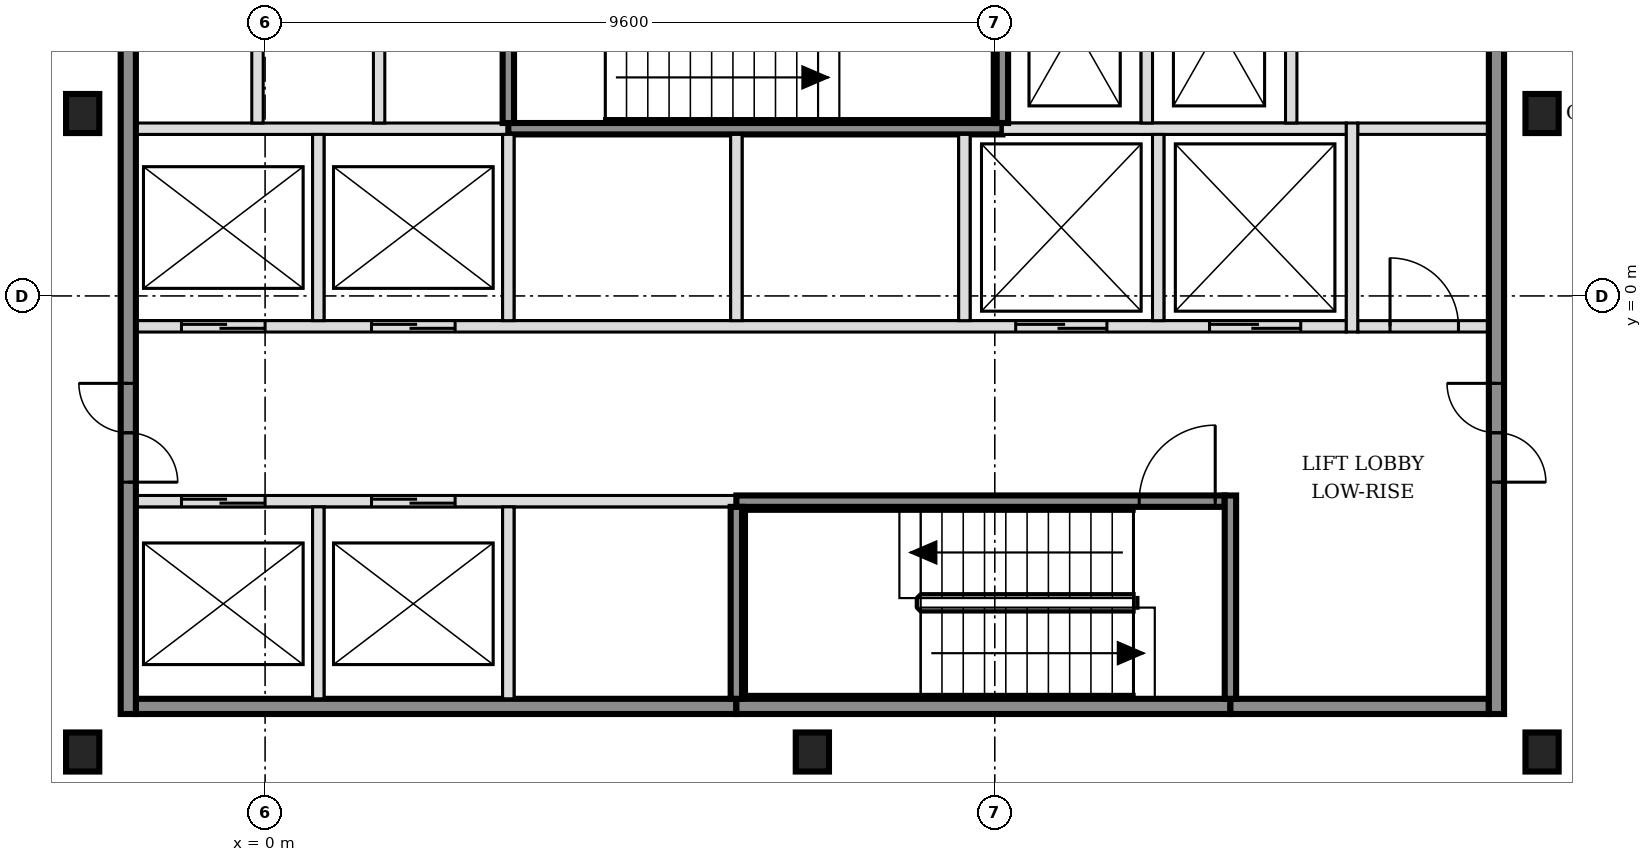
"""IFC4 building model, lengths in metres.
Left out: names, types, materials, properties, quantities, classifications, styles, units other than length and angle.
Written with IfcOpenShell. Run it as: python <this file> out.ifc"""

import sys

from ifc_helpers import new_model, si_unit, direction, frame, frame_2d, origin, origin_2d, place, context, subcontext, project, spatial, rectangle, i_section, extrude, element, fill, save


model = new_model("IFC4")
c1 = context("Model", 3, precision=1e-05, world=origin(), true_north=direction((0.0, 1.0)))
c2 = subcontext(c1, "Body", "Model", "MODEL_VIEW")
j1 = project(units=[si_unit("LENGTHUNIT", "METRE"), si_unit("PLANEANGLEUNIT", "RADIAN")], contexts=[c1])
p1 = place(None, origin())
s1 = spatial("IfcSite", under=j1, at=p1, CompositionType="ELEMENT")
p2 = place(p1, origin())
s2 = spatial("IfcBuilding", under=s1, at=p2, CompositionType="ELEMENT")
p3 = place(p2, frame((0.0, 0.0, 90.6)))
s3 = spatial("IfcBuildingStorey", under=s2, at=p3, CompositionType="ELEMENT", Elevation=90.6)
for number, where, z_axis, x_axis in (
    (1, (-2.4, -6.0, -0.15), (0.0, 0.0, 1.0), (1.0, 0.0, 0.0)),
    (2, (7.2, -6.0, -0.15), (0.0, 0.0, 1.0), (1.0, 0.0, 0.0)),
    (3, (16.8, -6.0, -0.15), (0.0, 0.0, 1.0), (1.0, 0.0, 0.0)),
    (4, (-2.4, 2.4, -0.15), (0.0, 0.0, 1.0), (1.0, 0.0, 0.0)),
    (5, (16.8, 2.4, -0.15), (0.0, 0.0, 1.0), (1.0, 0.0, 0.0)),
):
    element("IfcColumn", number, at=place(p3, frame(where, z_axis=z_axis, x_axis=x_axis)), inside=s3, PredefinedType="COLUMN", context=c2, shape_type="SweptSolid", body=[
        extrude(i_section(OverallWidth=0.437, OverallDepth=0.514, WebThickness=0.061, FlangeThickness=0.097, FilletRadius=0.015, at=origin_2d()), origin(), (0.0, 0.0, 1.0), 3.6),
    ])
p4 = place(p3, frame((-1.7, -5.4, 0.0), z_axis=(0.0, 0.0, 1.0), x_axis=(1.0, 0.0, 0.0)))
e6 = element("IfcWall", 6, at=p4, inside=s3, PredefinedType="SOLIDWALL", context=c2, shape_type="SweptSolid", body=[
    extrude(rectangle(XDim=7.9, YDim=0.2, at=frame_2d((3.95, 0.0))), origin(), (0.0, 0.0, 1.0), 3.45),
])
p5 = place(p3, frame((6.2, -5.4, 0.0), z_axis=(0.0, 0.0, 1.0), x_axis=(1.0, 0.0, 0.0)))
e7 = element("IfcWall", 7, at=p5, inside=s3, PredefinedType="SOLIDWALL", context=c2, shape_type="SweptSolid", body=[
    extrude(rectangle(XDim=6.5, YDim=0.2, at=frame_2d((3.25, 0.0))), origin(), (0.0, 0.0, 1.0), 3.45),
])
p6 = place(p3, frame((12.7, -5.4, 0.0), z_axis=(0.0, 0.0, 1.0), x_axis=(1.0, 0.0, 0.0)))
e8 = element("IfcWall", 8, at=p6, inside=s3, PredefinedType="SOLIDWALL", context=c2, shape_type="SweptSolid", body=[
    extrude(rectangle(XDim=3.4, YDim=0.2, at=frame_2d((1.7, 0.0))), origin(), (0.0, 0.0, 1.0), 3.45),
])
p7 = place(p3, frame((-1.7, -2.7, 0.0), z_axis=(0.0, 0.0, 1.0), x_axis=(1.0, 0.0, 0.0)))
e9 = element("IfcWall", 9, at=p7, inside=s3, PredefinedType="SOLIDWALL", context=c2, shape_type="SweptSolid", body=[
    extrude(rectangle(XDim=7.9, YDim=0.15, at=frame_2d((3.95, 0.0))), origin(), (0.0, 0.0, 1.0), 3.45),
])
p8 = place(p7, frame((0.6, 0.0, 0.0)))
e10 = element("IfcOpeningElement", 10, at=p8, cuts=e9, PredefinedType="OPENING", context=c2, shape_type="SweptSolid", body=[
    extrude(rectangle(XDim=1.1, YDim=2.1, at=frame_2d((0.55, 1.05))), frame((0.0, 0.085, 0.0), z_axis=(0.0, -1.0, 0.0), x_axis=(1.0, 0.0, 0.0)), (0.0, 0.0, 1.0), 0.17),
])
p9 = place(p7, frame((3.1, 0.0, 0.0)))
e11 = element("IfcOpeningElement", 11, at=p9, cuts=e9, PredefinedType="OPENING", context=c2, shape_type="SweptSolid", body=[
    extrude(rectangle(XDim=1.1, YDim=2.1, at=frame_2d((0.55, 1.05))), frame((0.0, 0.085, 0.0), z_axis=(0.0, -1.0, 0.0), x_axis=(1.0, 0.0, 0.0)), (0.0, 0.0, 1.0), 0.17),
])
p10 = place(p3, frame((6.2, -2.7, 0.0), z_axis=(0.0, 0.0, 1.0), x_axis=(1.0, 0.0, 0.0)))
e12 = element("IfcWall", 12, at=p10, inside=s3, PredefinedType="SOLIDWALL", context=c2, shape_type="SweptSolid", body=[
    extrude(rectangle(XDim=6.425, YDim=0.15, at=frame_2d((3.212, 0.0))), origin(), (0.0, 0.0, 1.0), 3.45),
])
p11 = place(p10, frame((5.3, 0.0, 0.0)))
e13 = element("IfcOpeningElement", 13, at=p11, cuts=e12, PredefinedType="OPENING", context=c2, shape_type="SweptSolid", body=[
    extrude(rectangle(XDim=1.0, YDim=2.1, at=frame_2d((0.5, 1.05))), frame((0.0, 0.085, 0.0), z_axis=(0.0, -1.0, 0.0), x_axis=(1.0, 0.0, 0.0)), (0.0, 0.0, 1.0), 0.17),
])
p12 = place(p3, frame((-1.7, -0.4, 0.0), z_axis=(0.0, 0.0, 1.0), x_axis=(1.0, 0.0, 0.0)))
e14 = element("IfcWall", 14, at=p12, inside=s3, PredefinedType="SOLIDWALL", context=c2, shape_type="SweptSolid", body=[
    extrude(rectangle(XDim=15.925, YDim=0.15, at=frame_2d((7.962, 0.0))), origin(), (0.0, 0.0, 1.0), 3.45),
])
p13 = place(p12, frame((0.6, 0.0, 0.0)))
e15 = element("IfcOpeningElement", 15, at=p13, cuts=e14, PredefinedType="OPENING", context=c2, shape_type="SweptSolid", body=[
    extrude(rectangle(XDim=1.1, YDim=2.1, at=frame_2d((0.55, 1.05))), frame((0.0, 0.085, 0.0), z_axis=(0.0, -1.0, 0.0), x_axis=(1.0, 0.0, 0.0)), (0.0, 0.0, 1.0), 0.17),
])
p14 = place(p12, frame((3.1, 0.0, 0.0)))
e16 = element("IfcOpeningElement", 16, at=p14, cuts=e14, PredefinedType="OPENING", context=c2, shape_type="SweptSolid", body=[
    extrude(rectangle(XDim=1.1, YDim=2.1, at=frame_2d((0.55, 1.05))), frame((0.0, 0.085, 0.0), z_axis=(0.0, -1.0, 0.0), x_axis=(1.0, 0.0, 0.0)), (0.0, 0.0, 1.0), 0.17),
])
p15 = place(p12, frame((11.575, 0.0, 0.0)))
e17 = element("IfcOpeningElement", 17, at=p15, cuts=e14, PredefinedType="OPENING", context=c2, shape_type="SweptSolid", body=[
    extrude(rectangle(XDim=1.2, YDim=2.1, at=frame_2d((0.6, 1.05))), frame((0.0, 0.085, 0.0), z_axis=(0.0, -1.0, 0.0), x_axis=(1.0, 0.0, 0.0)), (0.0, 0.0, 1.0), 0.17),
])
p16 = place(p12, frame((14.125, 0.0, 0.0)))
e18 = element("IfcOpeningElement", 18, at=p16, cuts=e14, PredefinedType="OPENING", context=c2, shape_type="SweptSolid", body=[
    extrude(rectangle(XDim=1.2, YDim=2.1, at=frame_2d((0.6, 1.05))), frame((0.0, 0.085, 0.0), z_axis=(0.0, -1.0, 0.0), x_axis=(1.0, 0.0, 0.0)), (0.0, 0.0, 1.0), 0.17),
])
p17 = place(p3, frame((14.375, -0.4, 0.0), z_axis=(0.0, 0.0, 1.0), x_axis=(1.0, 0.0, 0.0)))
e19 = element("IfcWall", 19, at=p17, inside=s3, PredefinedType="PARTITIONING", context=c2, shape_type="SweptSolid", body=[
    extrude(rectangle(XDim=1.725, YDim=0.15, at=frame_2d((0.863, 0.0))), origin(), (0.0, 0.0, 1.0), 3.45),
])
p18 = place(p17, frame((0.425, 0.0, 0.0)))
e20 = element("IfcOpeningElement", 20, at=p18, cuts=e19, PredefinedType="OPENING", context=c2, shape_type="SweptSolid", body=[
    extrude(rectangle(XDim=0.9, YDim=2.1, at=frame_2d((0.45, 1.05))), frame((0.0, 0.085, 0.0), z_axis=(0.0, -1.0, 0.0), x_axis=(1.0, 0.0, 0.0)), (0.0, 0.0, 1.0), 0.17),
])
p19 = place(p3, frame((-1.7, 2.2, 0.0), z_axis=(0.0, 0.0, 1.0), x_axis=(1.0, 0.0, 0.0)))
e21 = element("IfcWall", 21, at=p19, inside=s3, PredefinedType="SOLIDWALL", context=c2, shape_type="SweptSolid", body=[
    extrude(rectangle(XDim=4.9, YDim=0.15, at=frame_2d((2.45, 0.0))), origin(), (0.0, 0.0, 1.0), 3.45),
])
p20 = place(p3, frame((3.2, 2.2, 0.0), z_axis=(0.0, 0.0, 1.0), x_axis=(1.0, 0.0, 0.0)))
e22 = element("IfcWall", 22, at=p20, inside=s3, PredefinedType="SOLIDWALL", context=c2, shape_type="SweptSolid", body=[
    extrude(rectangle(XDim=6.5, YDim=0.15, at=frame_2d((3.25, 0.0))), origin(), (0.0, 0.0, 1.0), 3.45),
])
p21 = place(p3, frame((9.7, 2.2, 0.0), z_axis=(0.0, 0.0, 1.0), x_axis=(1.0, 0.0, 0.0)))
e23 = element("IfcWall", 23, at=p21, inside=s3, PredefinedType="SOLIDWALL", context=c2, shape_type="SweptSolid", body=[
    extrude(rectangle(XDim=4.525, YDim=0.15, at=frame_2d((2.263, 0.0))), origin(), (0.0, 0.0, 1.0), 3.45),
])
p22 = place(p3, frame((14.375, 2.2, 0.0), z_axis=(0.0, 0.0, 1.0), x_axis=(1.0, 0.0, 0.0)))
e24 = element("IfcWall", 24, at=p22, inside=s3, PredefinedType="PARTITIONING", context=c2, shape_type="SweptSolid", body=[
    extrude(rectangle(XDim=1.725, YDim=0.15, at=frame_2d((0.863, 0.0))), origin(), (0.0, 0.0, 1.0), 3.45),
])
p23 = place(p3, frame((-1.8, -5.5, 0.0), z_axis=(0.0, 0.0, 1.0), x_axis=(0.0, 1.0, 0.0)))
e25 = element("IfcWall", 25, at=p23, inside=s3, PredefinedType="SOLIDWALL", context=c2, shape_type="SweptSolid", body=[
    extrude(rectangle(XDim=15.8, YDim=0.2, at=frame_2d((7.9, 0.0))), origin(), (0.0, 0.0, 1.0), 3.45),
])
p24 = place(p23, frame((3.05, 0.0, 0.0)))
e26 = element("IfcOpeningElement", 26, at=p24, cuts=e25, PredefinedType="OPENING", context=c2, shape_type="SweptSolid", body=[
    extrude(rectangle(XDim=1.3, YDim=2.1, at=frame_2d((0.65, 1.05))), frame((0.0, 0.11, 0.0), z_axis=(0.0, -1.0, 0.0), x_axis=(1.0, 0.0, 0.0)), (0.0, 0.0, 1.0), 0.22),
])
p25 = place(p23, frame((11.45, 0.0, 0.0)))
e27 = element("IfcOpeningElement", 27, at=p25, cuts=e25, PredefinedType="OPENING", context=c2, shape_type="SweptSolid", body=[
    extrude(rectangle(XDim=1.3, YDim=2.1, at=frame_2d((0.65, 1.05))), frame((0.0, 0.11, 0.0), z_axis=(0.0, -1.0, 0.0), x_axis=(1.0, 0.0, 0.0)), (0.0, 0.0, 1.0), 0.22),
])
p26 = place(p3, frame((-0.1, 2.275, 0.0), z_axis=(0.0, 0.0, 1.0), x_axis=(0.0, 1.0, 0.0)))
e28 = element("IfcWall", 28, at=p26, inside=s3, PredefinedType="PARTITIONING", context=c2, shape_type="SweptSolid", body=[
    extrude(rectangle(XDim=2.55, YDim=0.15, at=frame_2d((1.275, 0.0))), origin(), (0.0, 0.0, 1.0), 3.45),
])
p27 = place(p3, frame((0.7, -5.3, 0.0), z_axis=(0.0, 0.0, 1.0), x_axis=(0.0, 1.0, 0.0)))
e29 = element("IfcWall", 29, at=p27, inside=s3, PredefinedType="SOLIDWALL", context=c2, shape_type="SweptSolid", body=[
    extrude(rectangle(XDim=2.525, YDim=0.15, at=frame_2d((1.263, 0.0))), origin(), (0.0, 0.0, 1.0), 3.45),
])
p28 = place(p3, frame((0.7, -0.325, 0.0), z_axis=(0.0, 0.0, 1.0), x_axis=(0.0, 1.0, 0.0)))
e30 = element("IfcWall", 30, at=p28, inside=s3, PredefinedType="SOLIDWALL", context=c2, shape_type="SweptSolid", body=[
    extrude(rectangle(XDim=2.45, YDim=0.15, at=frame_2d((1.225, 0.0))), origin(), (0.0, 0.0, 1.0), 3.45),
])
p29 = place(p3, frame((1.5, 2.275, 0.0), z_axis=(0.0, 0.0, 1.0), x_axis=(0.0, 1.0, 0.0)))
e31 = element("IfcWall", 31, at=p29, inside=s3, PredefinedType="PARTITIONING", context=c2, shape_type="SweptSolid", body=[
    extrude(rectangle(XDim=2.55, YDim=0.15, at=frame_2d((1.275, 0.0))), origin(), (0.0, 0.0, 1.0), 3.45),
])
p30 = place(p3, frame((3.2, -5.3, 0.0), z_axis=(0.0, 0.0, 1.0), x_axis=(0.0, 1.0, 0.0)))
e32 = element("IfcWall", 32, at=p30, inside=s3, PredefinedType="SOLIDWALL", context=c2, shape_type="SweptSolid", body=[
    extrude(rectangle(XDim=2.525, YDim=0.15, at=frame_2d((1.263, 0.0))), origin(), (0.0, 0.0, 1.0), 3.45),
])
p31 = place(p3, frame((3.2, -0.325, 0.0), z_axis=(0.0, 0.0, 1.0), x_axis=(0.0, 1.0, 0.0)))
e33 = element("IfcWall", 33, at=p31, inside=s3, PredefinedType="SOLIDWALL", context=c2, shape_type="SweptSolid", body=[
    extrude(rectangle(XDim=2.45, YDim=0.15, at=frame_2d((1.225, 0.0))), origin(), (0.0, 0.0, 1.0), 3.45),
])
p32 = place(p3, frame((3.2, 2.275, 0.0), z_axis=(0.0, 0.0, 1.0), x_axis=(0.0, 1.0, 0.0)))
e34 = element("IfcWall", 34, at=p32, inside=s3, PredefinedType="SOLIDWALL", context=c2, shape_type="SweptSolid", body=[
    extrude(rectangle(XDim=2.7, YDim=0.15, at=frame_2d((1.35, 0.0))), origin(), (0.0, 0.0, 1.0), 3.45),
])
p33 = place(p3, frame((6.2, -5.3, 0.0), z_axis=(0.0, 0.0, 1.0), x_axis=(0.0, 1.0, 0.0)))
e35 = element("IfcWall", 35, at=p33, inside=s3, PredefinedType="SOLIDWALL", context=c2, shape_type="SweptSolid", body=[
    extrude(rectangle(XDim=2.525, YDim=0.15, at=frame_2d((1.263, 0.0))), origin(), (0.0, 0.0, 1.0), 3.45),
])
for number, where, z_axis, x_axis in (
    (36, (6.2, -0.325, 0.0), (0.0, 0.0, 1.0), (0.0, 1.0, 0.0)),
    (37, (9.2, -0.325, 0.0), (0.0, 0.0, 1.0), (0.0, 1.0, 0.0)),
):
    element("IfcWall", number, at=place(p3, frame(where, z_axis=z_axis, x_axis=x_axis)), inside=s3, PredefinedType="SOLIDWALL", context=c2, shape_type="SweptSolid", body=[
        extrude(rectangle(XDim=2.45, YDim=0.15, at=frame_2d((1.225, 0.0))), origin(), (0.0, 0.0, 1.0), 3.45),
    ])
for number, where, z_axis, x_axis in (
    (38, (9.7, 2.275, 0.0), (0.0, 0.0, 1.0), (0.0, 1.0, 0.0)),
    (39, (11.6, 2.275, 0.0), (0.0, 0.0, 1.0), (0.0, 1.0, 0.0)),
):
    element("IfcWall", number, at=place(p3, frame(where, z_axis=z_axis, x_axis=x_axis)), inside=s3, PredefinedType="SOLIDWALL", context=c2, shape_type="SweptSolid", body=[
        extrude(rectangle(XDim=2.55, YDim=0.15, at=frame_2d((1.275, 0.0))), origin(), (0.0, 0.0, 1.0), 3.45),
    ])
p34 = place(p3, frame((11.75, -0.325, 0.0), z_axis=(0.0, 0.0, 1.0), x_axis=(0.0, 1.0, 0.0)))
e40 = element("IfcWall", 40, at=p34, inside=s3, PredefinedType="SOLIDWALL", context=c2, shape_type="SweptSolid", body=[
    extrude(rectangle(XDim=2.45, YDim=0.15, at=frame_2d((1.225, 0.0))), origin(), (0.0, 0.0, 1.0), 3.45),
])
p35 = place(p3, frame((12.7, -5.3, 0.0), z_axis=(0.0, 0.0, 1.0), x_axis=(0.0, 1.0, 0.0)))
e41 = element("IfcWall", 41, at=p35, inside=s3, PredefinedType="SOLIDWALL", context=c2, shape_type="SweptSolid", body=[
    extrude(rectangle(XDim=2.675, YDim=0.15, at=frame_2d((1.337, 0.0))), origin(), (0.0, 0.0, 1.0), 3.45),
])
p36 = place(p3, frame((13.5, 2.275, 0.0), z_axis=(0.0, 0.0, 1.0), x_axis=(0.0, 1.0, 0.0)))
e42 = element("IfcWall", 42, at=p36, inside=s3, PredefinedType="SOLIDWALL", context=c2, shape_type="SweptSolid", body=[
    extrude(rectangle(XDim=2.55, YDim=0.15, at=frame_2d((1.275, 0.0))), origin(), (0.0, 0.0, 1.0), 3.45),
])
p37 = place(p3, frame((14.3, -0.475, 0.0), z_axis=(0.0, 0.0, 1.0), x_axis=(0.0, 1.0, 0.0)))
e43 = element("IfcWall", 43, at=p37, inside=s3, PredefinedType="SOLIDWALL", context=c2, shape_type="SweptSolid", body=[
    extrude(rectangle(XDim=2.75, YDim=0.15, at=frame_2d((1.375, 0.0))), origin(), (0.0, 0.0, 1.0), 3.45),
])
p38 = place(p3, frame((16.2, -5.5, 0.0), z_axis=(0.0, 0.0, 1.0), x_axis=(0.0, 1.0, 0.0)))
e44 = element("IfcWall", 44, at=p38, inside=s3, PredefinedType="SOLIDWALL", context=c2, shape_type="SweptSolid", body=[
    extrude(rectangle(XDim=15.8, YDim=0.2, at=frame_2d((7.9, 0.0))), origin(), (0.0, 0.0, 1.0), 3.45),
])
p39 = place(p38, frame((3.05, 0.0, 0.0)))
e45 = element("IfcOpeningElement", 45, at=p39, cuts=e44, PredefinedType="OPENING", context=c2, shape_type="SweptSolid", body=[
    extrude(rectangle(XDim=1.3, YDim=2.1, at=frame_2d((0.65, 1.05))), frame((0.0, 0.11, 0.0), z_axis=(0.0, -1.0, 0.0), x_axis=(1.0, 0.0, 0.0)), (0.0, 0.0, 1.0), 0.22),
])
p40 = place(p38, frame((11.45, 0.0, 0.0)))
e46 = element("IfcOpeningElement", 46, at=p40, cuts=e44, PredefinedType="OPENING", context=c2, shape_type="SweptSolid", body=[
    extrude(rectangle(XDim=1.3, YDim=2.1, at=frame_2d((0.65, 1.05))), frame((0.0, 0.11, 0.0), z_axis=(0.0, -1.0, 0.0), x_axis=(1.0, 0.0, 0.0)), (0.0, 0.0, 1.0), 0.22),
])
p41 = place(p8, origin())
e47 = element("IfcDoor", 47, at=p41, inside=s3, OperationType="DOUBLE_DOOR_SLIDING", PredefinedType="DOOR", context=c2, shape_type="SweptSolid", body=[
    extrude(rectangle(XDim=1.1, YDim=2.1, at=frame_2d((0.55, 1.05))), frame((0.0, 0.025, 0.0), z_axis=(0.0, -1.0, 0.0), x_axis=(1.0, 0.0, 0.0)), (0.0, 0.0, 1.0), 0.05),
])
fill(e10, e47)
p42 = place(p9, origin())
e48 = element("IfcDoor", 48, at=p42, inside=s3, OperationType="DOUBLE_DOOR_SLIDING", PredefinedType="DOOR", context=c2, shape_type="SweptSolid", body=[
    extrude(rectangle(XDim=1.1, YDim=2.1, at=frame_2d((0.55, 1.05))), frame((0.0, 0.025, 0.0), z_axis=(0.0, -1.0, 0.0), x_axis=(1.0, 0.0, 0.0)), (0.0, 0.0, 1.0), 0.05),
])
fill(e11, e48)
p43 = place(p13, origin())
e49 = element("IfcDoor", 49, at=p43, inside=s3, OperationType="DOUBLE_DOOR_SLIDING", PredefinedType="DOOR", context=c2, shape_type="SweptSolid", body=[
    extrude(rectangle(XDim=1.1, YDim=2.1, at=frame_2d((0.55, 1.05))), frame((0.0, 0.025, 0.0), z_axis=(0.0, -1.0, 0.0), x_axis=(1.0, 0.0, 0.0)), (0.0, 0.0, 1.0), 0.05),
])
fill(e15, e49)
p44 = place(p14, origin())
e50 = element("IfcDoor", 50, at=p44, inside=s3, OperationType="DOUBLE_DOOR_SLIDING", PredefinedType="DOOR", context=c2, shape_type="SweptSolid", body=[
    extrude(rectangle(XDim=1.1, YDim=2.1, at=frame_2d((0.55, 1.05))), frame((0.0, 0.025, 0.0), z_axis=(0.0, -1.0, 0.0), x_axis=(1.0, 0.0, 0.0)), (0.0, 0.0, 1.0), 0.05),
])
fill(e16, e50)
p45 = place(p15, origin())
e51 = element("IfcDoor", 51, at=p45, inside=s3, OperationType="DOUBLE_DOOR_SLIDING", PredefinedType="DOOR", context=c2, shape_type="SweptSolid", body=[
    extrude(rectangle(XDim=1.2, YDim=2.1, at=frame_2d((0.6, 1.05))), frame((0.0, 0.025, 0.0), z_axis=(0.0, -1.0, 0.0), x_axis=(1.0, 0.0, 0.0)), (0.0, 0.0, 1.0), 0.05),
])
fill(e17, e51)
p46 = place(p16, origin())
e52 = element("IfcDoor", 52, at=p46, inside=s3, OperationType="DOUBLE_DOOR_SLIDING", PredefinedType="DOOR", context=c2, shape_type="SweptSolid", body=[
    extrude(rectangle(XDim=1.2, YDim=2.1, at=frame_2d((0.6, 1.05))), frame((0.0, 0.025, 0.0), z_axis=(0.0, -1.0, 0.0), x_axis=(1.0, 0.0, 0.0)), (0.0, 0.0, 1.0), 0.05),
])
fill(e18, e52)
p47 = place(p11, origin())
e53 = element("IfcDoor", 53, at=p47, inside=s3, OperationType="SINGLE_SWING_RIGHT", PredefinedType="DOOR", context=c2, shape_type="SweptSolid", body=[
    extrude(rectangle(XDim=1.0, YDim=2.1, at=frame_2d((0.5, 1.05))), frame((0.0, 0.025, 0.0), z_axis=(0.0, -1.0, 0.0), x_axis=(1.0, 0.0, 0.0)), (0.0, 0.0, 1.0), 0.05),
])
fill(e13, e53)
p48 = place(p24, origin())
e54 = element("IfcDoor", 54, at=p48, inside=s3, OperationType="DOUBLE_DOOR_SINGLE_SWING", PredefinedType="DOOR", context=c2, shape_type="SweptSolid", body=[
    extrude(rectangle(XDim=1.3, YDim=2.1, at=frame_2d((0.65, 1.05))), frame((0.0, 0.025, 0.0), z_axis=(0.0, -1.0, 0.0), x_axis=(1.0, 0.0, 0.0)), (0.0, 0.0, 1.0), 0.05),
])
fill(e26, e54)
p49 = place(p39, origin())
e55 = element("IfcDoor", 55, at=p49, inside=s3, OperationType="DOUBLE_DOOR_SINGLE_SWING", PredefinedType="DOOR", context=c2, shape_type="SweptSolid", body=[
    extrude(rectangle(XDim=1.3, YDim=2.1, at=frame_2d((0.65, 1.05))), frame((0.0, 0.025, 0.0), z_axis=(0.0, -1.0, 0.0), x_axis=(1.0, 0.0, 0.0)), (0.0, 0.0, 1.0), 0.05),
])
fill(e45, e55)
p50 = place(p18, origin())
e56 = element("IfcDoor", 56, at=p50, inside=s3, OperationType="SINGLE_SWING_LEFT", PredefinedType="DOOR", context=c2, shape_type="SweptSolid", body=[
    extrude(rectangle(XDim=0.9, YDim=2.1, at=frame_2d((0.45, 1.05))), frame((0.0, 0.025, 0.0), z_axis=(0.0, -1.0, 0.0), x_axis=(1.0, 0.0, 0.0)), (0.0, 0.0, 1.0), 0.05),
])
fill(e20, e56)
save(model, sys.argv[1])
